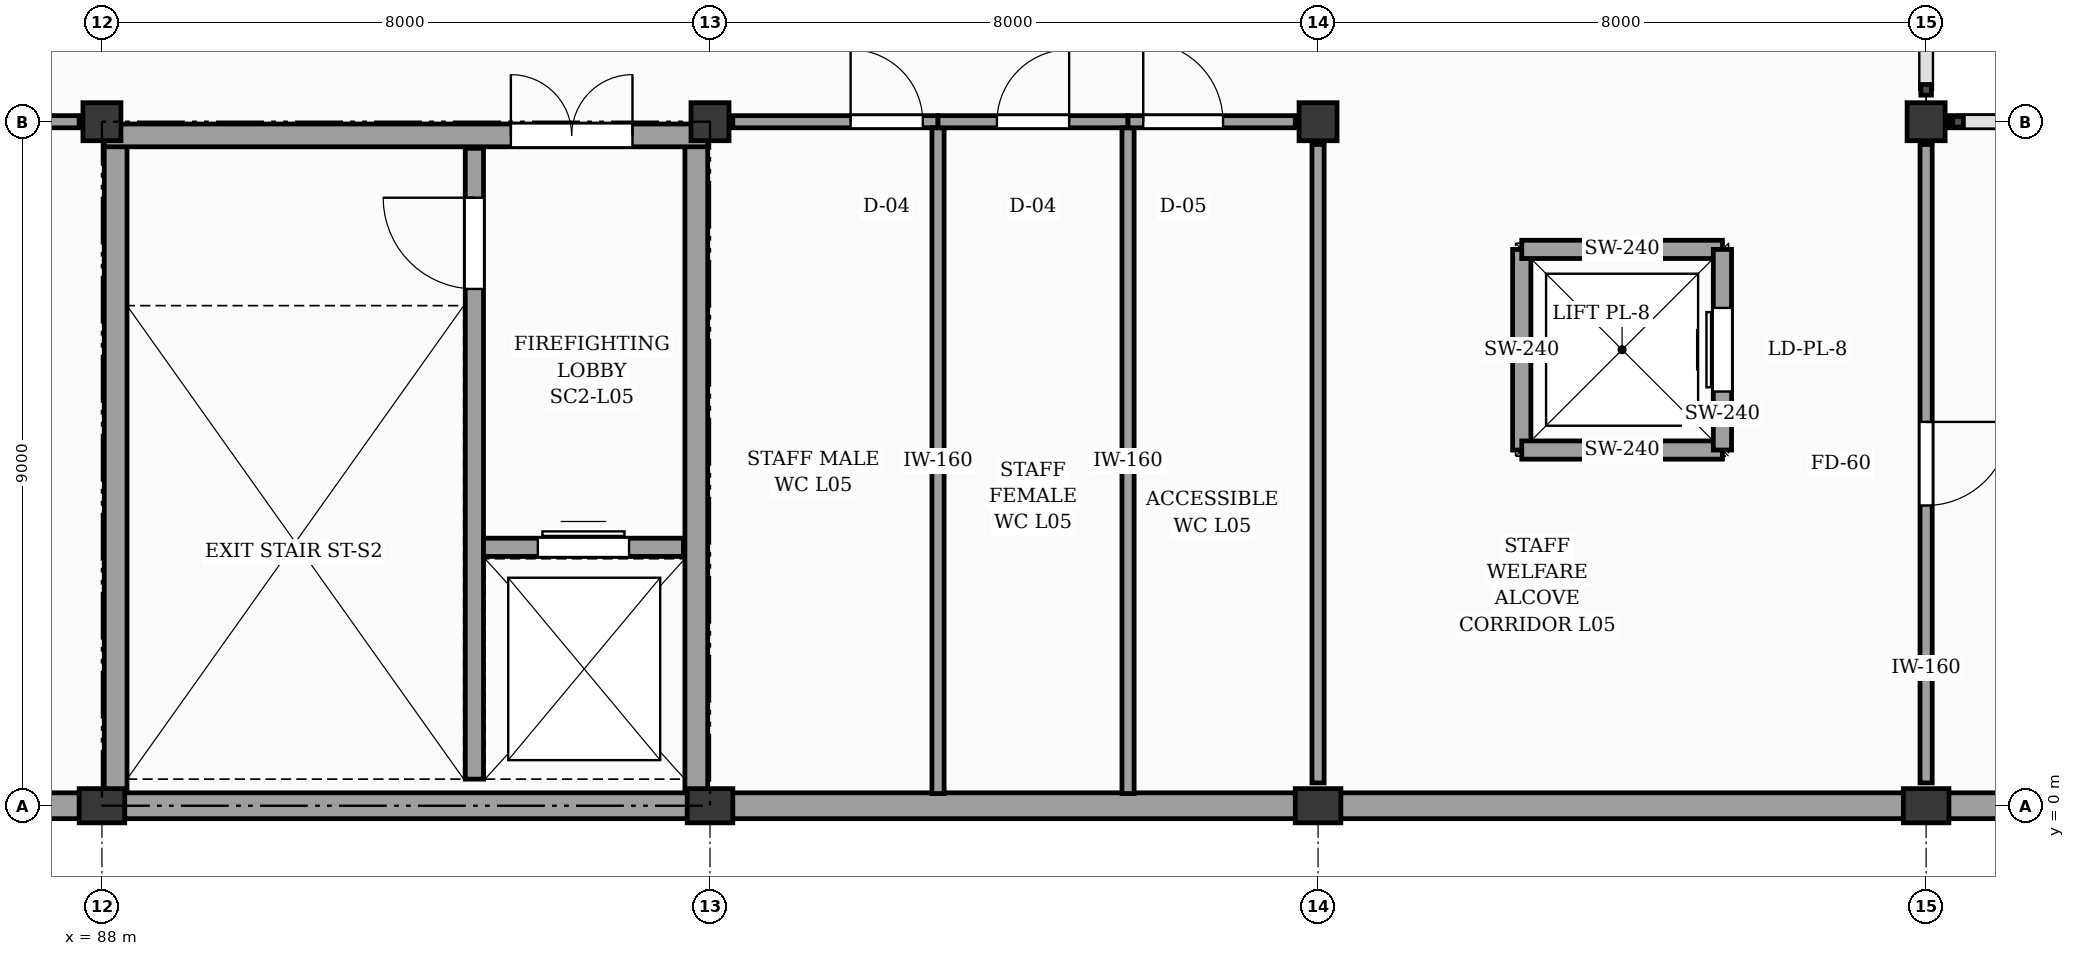
"""IFC4 building model, lengths in metres.
Left out: names, types, materials, properties, quantities, classifications, styles, units other than length and angle.
Written with IfcOpenShell. Run it as: python <this file> out.ifc"""

import sys

from ifc_helpers import new_model, si_unit, direction, frame, frame_2d, origin, origin_2d, place, context, subcontext, project, spatial, rectangle, extrude, element, fill, save


model = new_model("IFC4")
c1 = context("Model", 3, precision=1e-05, world=origin(), true_north=direction((0.0, 1.0)))
c2 = subcontext(c1, "Body", "Model", "MODEL_VIEW")
j1 = project(units=[si_unit("LENGTHUNIT", "METRE"), si_unit("PLANEANGLEUNIT", "RADIAN")], contexts=[c1])
p1 = place(None, origin())
s1 = spatial("IfcSite", under=j1, at=p1, CompositionType="ELEMENT")
p2 = place(p1, origin())
s2 = spatial("IfcBuilding", under=s1, at=p2, CompositionType="ELEMENT")
p3 = place(p2, frame((0.0, 0.0, 24.6)))
s3 = spatial("IfcBuildingStorey", under=s2, at=p3, CompositionType="ELEMENT", Elevation=24.6)
p4 = place(p3, frame((88.0, 0.0, 0.0), z_axis=(0.0, 0.0, 1.0), x_axis=(1.0, 0.0, 0.0)))
e1 = element("IfcColumn", 1, at=p4, inside=s3, PredefinedType="PILASTER", context=c2, shape_type="SweptSolid", body=[
    extrude(rectangle(XDim=0.6, YDim=0.45, at=origin_2d()), origin(), (0.0, 0.0, 1.0), 4.2),
])
p5 = place(p3, frame((88.0, 9.0, 0.0), z_axis=(0.0, 0.0, 1.0), x_axis=(1.0, 0.0, 0.0)))
e2 = element("IfcColumn", 2, at=p5, inside=s3, PredefinedType="COLUMN", context=c2, shape_type="SweptSolid", body=[
    extrude(rectangle(XDim=0.5, YDim=0.5, at=origin_2d()), origin(), (0.0, 0.0, 1.0), 4.2),
])
p6 = place(p3, frame((96.0, 0.0, 0.0), z_axis=(0.0, 0.0, 1.0), x_axis=(1.0, 0.0, 0.0)))
e3 = element("IfcColumn", 3, at=p6, inside=s3, PredefinedType="PILASTER", context=c2, shape_type="SweptSolid", body=[
    extrude(rectangle(XDim=0.6, YDim=0.45, at=origin_2d()), origin(), (0.0, 0.0, 1.0), 4.2),
])
p7 = place(p3, frame((96.0, 9.0, 0.0), z_axis=(0.0, 0.0, 1.0), x_axis=(1.0, 0.0, 0.0)))
e4 = element("IfcColumn", 4, at=p7, inside=s3, PredefinedType="COLUMN", context=c2, shape_type="SweptSolid", body=[
    extrude(rectangle(XDim=0.5, YDim=0.5, at=origin_2d()), origin(), (0.0, 0.0, 1.0), 4.2),
])
p8 = place(p3, frame((104.0, 0.0, 0.0), z_axis=(0.0, 0.0, 1.0), x_axis=(1.0, 0.0, 0.0)))
e5 = element("IfcColumn", 5, at=p8, inside=s3, PredefinedType="PILASTER", context=c2, shape_type="SweptSolid", body=[
    extrude(rectangle(XDim=0.6, YDim=0.45, at=origin_2d()), origin(), (0.0, 0.0, 1.0), 4.2),
])
p9 = place(p3, frame((104.0, 9.0, 0.0), z_axis=(0.0, 0.0, 1.0), x_axis=(1.0, 0.0, 0.0)))
e6 = element("IfcColumn", 6, at=p9, inside=s3, PredefinedType="COLUMN", context=c2, shape_type="SweptSolid", body=[
    extrude(rectangle(XDim=0.5, YDim=0.5, at=origin_2d()), origin(), (0.0, 0.0, 1.0), 4.2),
])
p10 = place(p3, frame((112.0, 0.0, 0.0), z_axis=(0.0, 0.0, 1.0), x_axis=(1.0, 0.0, 0.0)))
e7 = element("IfcColumn", 7, at=p10, inside=s3, PredefinedType="PILASTER", context=c2, shape_type="SweptSolid", body=[
    extrude(rectangle(XDim=0.6, YDim=0.45, at=origin_2d()), origin(), (0.0, 0.0, 1.0), 4.2),
])
p11 = place(p3, frame((112.0, 9.0, 0.0), z_axis=(0.0, 0.0, 1.0), x_axis=(1.0, 0.0, 0.0)))
e8 = element("IfcColumn", 8, at=p11, inside=s3, PredefinedType="COLUMN", context=c2, shape_type="SweptSolid", body=[
    extrude(rectangle(XDim=0.5, YDim=0.5, at=origin_2d()), origin(), (0.0, 0.0, 1.0), 4.2),
])
for number, where, z_axis, x_axis in (
    (9, (80.295, 0.0, 0.0), (0.0, 0.0, 1.0), (1.0, 0.0, 0.0)),
    (10, (88.295, 0.0, 0.0), (0.0, 0.0, 1.0), (1.0, 0.0, 0.0)),
    (11, (96.295, 0.0, 0.0), (0.0, 0.0, 1.0), (1.0, 0.0, 0.0)),
    (12, (104.295, 0.0, 0.0), (0.0, 0.0, 1.0), (1.0, 0.0, 0.0)),
    (13, (112.295, 0.0, 0.0), (0.0, 0.0, 1.0), (1.0, 0.0, 0.0)),
):
    element("IfcWall", number, at=place(p3, frame(where, z_axis=z_axis, x_axis=x_axis)), inside=s3, PredefinedType="SOLIDWALL", context=c2, shape_type="SweptSolid", body=[
        extrude(rectangle(XDim=7.41, YDim=0.34, at=frame_2d((3.705, 0.0))), origin(), (0.0, 0.0, 1.0), 3.24),
    ])
p12 = place(p3, frame((92.9, 0.35, 0.0), z_axis=(0.0, 0.0, 1.0), x_axis=(0.0, 1.0, 0.0)))
e14 = element("IfcWall", 14, at=p12, inside=s3, PredefinedType="SHEAR", context=c2, shape_type="SweptSolid", body=[
    extrude(rectangle(XDim=8.3, YDim=0.24, at=frame_2d((4.15, 0.0))), origin(), (0.0, 0.0, 1.0), 3.98),
])
p13 = place(p12, frame((6.45, 0.0, 0.0)))
e15 = element("IfcOpeningElement", 15, at=p13, cuts=e14, PredefinedType="OPENING", context=c2, shape_type="SweptSolid", body=[
    extrude(rectangle(XDim=1.2, YDim=2.15, at=frame_2d((0.6, 1.075))), frame((0.0, 0.13, 0.0), z_axis=(0.0, -1.0, 0.0), x_axis=(1.0, 0.0, 0.0)), (0.0, 0.0, 1.0), 0.26),
])
p14 = place(p3, frame((93.02, 3.4, 0.0), z_axis=(0.0, 0.0, 1.0), x_axis=(1.0, 0.0, 0.0)))
e16 = element("IfcWall", 16, at=p14, inside=s3, PredefinedType="SHEAR", context=c2, shape_type="SweptSolid", body=[
    extrude(rectangle(XDim=2.63, YDim=0.24, at=frame_2d((1.315, 0.0))), origin(), (0.0, 0.0, 1.0), 3.98),
])
p15 = place(p14, frame((0.715, 0.0, 0.0)))
e17 = element("IfcOpeningElement", 17, at=p15, cuts=e16, PredefinedType="OPENING", context=c2, shape_type="SweptSolid", body=[
    extrude(rectangle(XDim=1.2, YDim=2.15, at=frame_2d((0.6, 1.075))), frame((0.0, 0.13, 0.0), z_axis=(0.0, -1.0, 0.0), x_axis=(1.0, 0.0, 0.0)), (0.0, 0.0, 1.0), 0.26),
])
for number, where, z_axis, x_axis in (
    (18, (88.18, 0.18, 0.0), (0.0, 0.0, 1.0), (0.0, 1.0, 0.0)),
    (19, (95.82, 0.18, 0.0), (0.0, 0.0, 1.0), (0.0, 1.0, 0.0)),
):
    element("IfcWall", number, at=place(p3, frame(where, z_axis=z_axis, x_axis=x_axis)), inside=s3, PredefinedType="SHEAR", context=c2, shape_type="SweptSolid", body=[
        extrude(rectangle(XDim=8.64, YDim=0.3, at=frame_2d((4.32, 0.0))), origin(), (0.0, 0.0, 1.0), 3.98),
    ])
p16 = place(p3, frame((88.03, 8.82, 0.0), z_axis=(0.0, 0.0, 1.0), x_axis=(1.0, 0.0, 0.0)))
e20 = element("IfcWall", 20, at=p16, inside=s3, PredefinedType="SHEAR", context=c2, shape_type="SweptSolid", body=[
    extrude(rectangle(XDim=7.94, YDim=0.3, at=frame_2d((3.97, 0.0))), origin(), (0.0, 0.0, 1.0), 3.98),
])
p17 = place(p16, frame((5.35, 0.0, 0.0)))
e21 = element("IfcOpeningElement", 21, at=p17, cuts=e20, PredefinedType="OPENING", context=c2, shape_type="SweptSolid", body=[
    extrude(rectangle(XDim=1.6, YDim=2.15, at=frame_2d((0.8, 1.075))), frame((0.0, 0.16, 0.0), z_axis=(0.0, -1.0, 0.0), x_axis=(1.0, 0.0, 0.0)), (0.0, 0.0, 1.0), 0.32),
])
for number, where, z_axis, x_axis in (
    (22, (106.68, 4.68, 0.0), (0.0, 0.0, 1.0), (0.0, 1.0, 0.0)),
    (23, (106.68, 4.68, 0.0), (0.0, 0.0, 1.0), (1.0, 0.0, 0.0)),
    (24, (106.68, 7.32, 0.0), (0.0, 0.0, 1.0), (1.0, 0.0, 0.0)),
):
    element("IfcWall", number, at=place(p3, frame(where, z_axis=z_axis, x_axis=x_axis)), inside=s3, PredefinedType="SHEAR", context=c2, shape_type="SweptSolid", body=[
        extrude(rectangle(XDim=2.64, YDim=0.24, at=frame_2d((1.32, 0.0))), origin(), (0.0, 0.0, 1.0), 3.95),
    ])
p18 = place(p3, frame((109.32, 4.68, 0.0), z_axis=(0.0, 0.0, 1.0), x_axis=(0.0, 1.0, 0.0)))
e25 = element("IfcWall", 25, at=p18, inside=s3, PredefinedType="SHEAR", context=c2, shape_type="SweptSolid", body=[
    extrude(rectangle(XDim=2.64, YDim=0.24, at=frame_2d((1.32, 0.0))), origin(), (0.0, 0.0, 1.0), 3.95),
])
p19 = place(p18, frame((0.77, 0.0, 0.0)))
e26 = element("IfcOpeningElement", 26, at=p19, cuts=e25, PredefinedType="OPENING", context=c2, shape_type="SweptSolid", body=[
    extrude(rectangle(XDim=1.1, YDim=2.15, at=frame_2d((0.55, 1.075))), frame((0.0, 0.13, 0.0), z_axis=(0.0, -1.0, 0.0), x_axis=(1.0, 0.0, 0.0)), (0.0, 0.0, 1.0), 0.26),
])
p20 = place(p3, frame((80.3, 9.0, 0.0), z_axis=(0.0, 0.0, 1.0), x_axis=(1.0, 0.0, 0.0)))
e27 = element("IfcWall", 27, at=p20, inside=s3, PredefinedType="PARTITIONING", context=c2, shape_type="SweptSolid", body=[
    extrude(rectangle(XDim=7.4, YDim=0.16, at=frame_2d((3.7, 0.0))), origin(), (0.0, 0.0, 1.0), 3.1),
])
p21 = place(p20, frame((3.2, 0.0, 0.0)))
e28 = element("IfcOpeningElement", 28, at=p21, cuts=e27, PredefinedType="OPENING", context=c2, shape_type="SweptSolid", body=[
    extrude(rectangle(XDim=1.0, YDim=2.1, at=frame_2d((0.5, 1.05))), frame((0.0, 0.09, 0.0), z_axis=(0.0, -1.0, 0.0), x_axis=(1.0, 0.0, 0.0)), (0.0, 0.0, 1.0), 0.18),
])
p22 = place(p3, frame((96.3, 9.0, 0.0), z_axis=(0.0, 0.0, 1.0), x_axis=(1.0, 0.0, 0.0)))
e29 = element("IfcWall", 29, at=p22, inside=s3, PredefinedType="PARTITIONING", context=c2, shape_type="SweptSolid", body=[
    extrude(rectangle(XDim=2.7, YDim=0.16, at=frame_2d((1.35, 0.0))), origin(), (0.0, 0.0, 1.0), 3.1),
])
p23 = place(p22, frame((1.55, 0.0, 0.0)))
e30 = element("IfcOpeningElement", 30, at=p23, cuts=e29, PredefinedType="OPENING", context=c2, shape_type="SweptSolid", body=[
    extrude(rectangle(XDim=0.95, YDim=2.1, at=frame_2d((0.475, 1.05))), frame((0.0, 0.09, 0.0), z_axis=(0.0, -1.0, 0.0), x_axis=(1.0, 0.0, 0.0)), (0.0, 0.0, 1.0), 0.18),
])
p24 = place(p3, frame((99.0, 0.16, 0.0), z_axis=(0.0, 0.0, 1.0), x_axis=(0.0, 1.0, 0.0)))
e31 = element("IfcWall", 31, at=p24, inside=s3, PredefinedType="PARTITIONING", context=c2, shape_type="SweptSolid", body=[
    extrude(rectangle(XDim=8.76, YDim=0.16, at=frame_2d((4.38, 0.0))), origin(), (0.0, 0.0, 1.0), 3.1),
])
p25 = place(p3, frame((99.0, 9.0, 0.0), z_axis=(0.0, 0.0, 1.0), x_axis=(1.0, 0.0, 0.0)))
e32 = element("IfcWall", 32, at=p25, inside=s3, PredefinedType="PARTITIONING", context=c2, shape_type="SweptSolid", body=[
    extrude(rectangle(XDim=2.5, YDim=0.16, at=frame_2d((1.25, 0.0))), origin(), (0.0, 0.0, 1.0), 3.1),
])
p26 = place(p25, frame((0.775, 0.0, 0.0)))
e33 = element("IfcOpeningElement", 33, at=p26, cuts=e32, PredefinedType="OPENING", context=c2, shape_type="SweptSolid", body=[
    extrude(rectangle(XDim=0.95, YDim=2.1, at=frame_2d((0.475, 1.05))), frame((0.0, 0.09, 0.0), z_axis=(0.0, -1.0, 0.0), x_axis=(1.0, 0.0, 0.0)), (0.0, 0.0, 1.0), 0.18),
])
p27 = place(p3, frame((101.5, 0.16, 0.0), z_axis=(0.0, 0.0, 1.0), x_axis=(0.0, 1.0, 0.0)))
e34 = element("IfcWall", 34, at=p27, inside=s3, PredefinedType="PARTITIONING", context=c2, shape_type="SweptSolid", body=[
    extrude(rectangle(XDim=8.76, YDim=0.16, at=frame_2d((4.38, 0.0))), origin(), (0.0, 0.0, 1.0), 3.1),
])
p28 = place(p3, frame((101.5, 9.0, 0.0), z_axis=(0.0, 0.0, 1.0), x_axis=(1.0, 0.0, 0.0)))
e35 = element("IfcWall", 35, at=p28, inside=s3, PredefinedType="PARTITIONING", context=c2, shape_type="SweptSolid", body=[
    extrude(rectangle(XDim=2.2, YDim=0.16, at=frame_2d((1.1, 0.0))), origin(), (0.0, 0.0, 1.0), 3.1),
])
p29 = place(p28, frame((0.2, 0.0, 0.0)))
e36 = element("IfcOpeningElement", 36, at=p29, cuts=e35, PredefinedType="OPENING", context=c2, shape_type="SweptSolid", body=[
    extrude(rectangle(XDim=1.05, YDim=2.1, at=frame_2d((0.525, 1.05))), frame((0.0, 0.09, 0.0), z_axis=(0.0, -1.0, 0.0), x_axis=(1.0, 0.0, 0.0)), (0.0, 0.0, 1.0), 0.18),
])
p30 = place(p3, frame((104.0, 0.3, 0.0), z_axis=(0.0, 0.0, 1.0), x_axis=(0.0, 1.0, 0.0)))
e37 = element("IfcWall", 37, at=p30, inside=s3, PredefinedType="PARTITIONING", context=c2, shape_type="SweptSolid", body=[
    extrude(rectangle(XDim=8.4, YDim=0.16, at=frame_2d((4.2, 0.0))), origin(), (0.0, 0.0, 1.0), 3.1),
])
p31 = place(p3, frame((112.3, 9.0, 0.0), z_axis=(0.0, 0.0, 1.0), x_axis=(1.0, 0.0, 0.0)))
e38 = element("IfcWall", 38, at=p31, inside=s3, PredefinedType="PARTITIONING", context=c2, shape_type="SweptSolid", body=[
    extrude(rectangle(XDim=7.4, YDim=0.16, at=frame_2d((3.7, 0.0))), origin(), (0.0, 0.0, 1.0), 3.1),
])
p32 = place(p3, frame((112.0, 0.3, 0.0), z_axis=(0.0, 0.0, 1.0), x_axis=(0.0, 1.0, 0.0)))
e39 = element("IfcWall", 39, at=p32, inside=s3, PredefinedType="PARTITIONING", context=c2, shape_type="SweptSolid", body=[
    extrude(rectangle(XDim=8.4, YDim=0.16, at=frame_2d((4.2, 0.0))), origin(), (0.0, 0.0, 1.0), 3.1),
])
p33 = place(p32, frame((3.65, 0.0, 0.0)))
e40 = element("IfcOpeningElement", 40, at=p33, cuts=e39, PredefinedType="OPENING", context=c2, shape_type="SweptSolid", body=[
    extrude(rectangle(XDim=1.1, YDim=2.15, at=frame_2d((0.55, 1.075))), frame((0.0, 0.09, 0.0), z_axis=(0.0, -1.0, 0.0), x_axis=(1.0, 0.0, 0.0)), (0.0, 0.0, 1.0), 0.18),
])
p34 = place(p13, origin())
e41 = element("IfcDoor", 41, at=p34, inside=s3, OperationType="SINGLE_SWING_RIGHT", PredefinedType="DOOR", context=c2, shape_type="SweptSolid", body=[
    extrude(rectangle(XDim=1.2, YDim=2.15, at=frame_2d((0.6, 1.075))), frame((0.0, 0.025, 0.0), z_axis=(0.0, -1.0, 0.0), x_axis=(1.0, 0.0, 0.0)), (0.0, 0.0, 1.0), 0.05),
])
fill(e15, e41)
p35 = place(p15, origin())
e42 = element("IfcDoor", 42, at=p35, inside=s3, OperationType="DOUBLE_DOOR_SLIDING", PredefinedType="DOOR", context=c2, shape_type="SweptSolid", body=[
    extrude(rectangle(XDim=1.2, YDim=2.15, at=frame_2d((0.6, 1.075))), frame((0.0, 0.025, 0.0), z_axis=(0.0, -1.0, 0.0), x_axis=(1.0, 0.0, 0.0)), (0.0, 0.0, 1.0), 0.05),
])
fill(e17, e42)
p36 = place(p17, origin())
e43 = element("IfcDoor", 43, at=p36, inside=s3, OperationType="DOUBLE_DOOR_SINGLE_SWING", PredefinedType="DOOR", context=c2, shape_type="SweptSolid", body=[
    extrude(rectangle(XDim=1.6, YDim=2.15, at=frame_2d((0.8, 1.075))), frame((0.0, 0.025, 0.0), z_axis=(0.0, -1.0, 0.0), x_axis=(1.0, 0.0, 0.0)), (0.0, 0.0, 1.0), 0.05),
])
fill(e21, e43)
p37 = place(p19, origin())
e44 = element("IfcDoor", 44, at=p37, inside=s3, OperationType="DOUBLE_DOOR_SLIDING", PredefinedType="DOOR", context=c2, shape_type="SweptSolid", body=[
    extrude(rectangle(XDim=1.1, YDim=2.15, at=frame_2d((0.55, 1.075))), frame((0.0, 0.025, 0.0), z_axis=(0.0, -1.0, 0.0), x_axis=(1.0, 0.0, 0.0)), (0.0, 0.0, 1.0), 0.05),
])
fill(e26, e44)
p38 = place(p23, origin())
e45 = element("IfcDoor", 45, at=p38, inside=s3, OperationType="SINGLE_SWING_LEFT", PredefinedType="DOOR", context=c2, shape_type="SweptSolid", body=[
    extrude(rectangle(XDim=0.95, YDim=2.1, at=frame_2d((0.475, 1.05))), frame((0.0, 0.025, 0.0), z_axis=(0.0, -1.0, 0.0), x_axis=(1.0, 0.0, 0.0)), (0.0, 0.0, 1.0), 0.05),
])
fill(e30, e45)
p39 = place(p26, origin())
e46 = element("IfcDoor", 46, at=p39, inside=s3, OperationType="SINGLE_SWING_RIGHT", PredefinedType="DOOR", context=c2, shape_type="SweptSolid", body=[
    extrude(rectangle(XDim=0.95, YDim=2.1, at=frame_2d((0.475, 1.05))), frame((0.0, 0.025, 0.0), z_axis=(0.0, -1.0, 0.0), x_axis=(1.0, 0.0, 0.0)), (0.0, 0.0, 1.0), 0.05),
])
fill(e33, e46)
p40 = place(p29, origin())
e47 = element("IfcDoor", 47, at=p40, inside=s3, OperationType="SINGLE_SWING_LEFT", PredefinedType="DOOR", context=c2, shape_type="SweptSolid", body=[
    extrude(rectangle(XDim=1.05, YDim=2.1, at=frame_2d((0.525, 1.05))), frame((0.0, 0.025, 0.0), z_axis=(0.0, -1.0, 0.0), x_axis=(1.0, 0.0, 0.0)), (0.0, 0.0, 1.0), 0.05),
])
fill(e36, e47)
p41 = place(p33, frame((1.1, 0.0, 0.0), z_axis=(0.0, 0.0, 1.0), x_axis=(-1.0, 0.0, 0.0)))
e48 = element("IfcDoor", 48, at=p41, inside=s3, OperationType="SINGLE_SWING_RIGHT", PredefinedType="DOOR", context=c2, shape_type="SweptSolid", body=[
    extrude(rectangle(XDim=1.1, YDim=2.15, at=frame_2d((0.55, 1.075))), frame((0.0, 0.025, 0.0), z_axis=(0.0, -1.0, 0.0), x_axis=(1.0, 0.0, 0.0)), (0.0, 0.0, 1.0), 0.05),
])
fill(e40, e48)
save(model, sys.argv[1])
